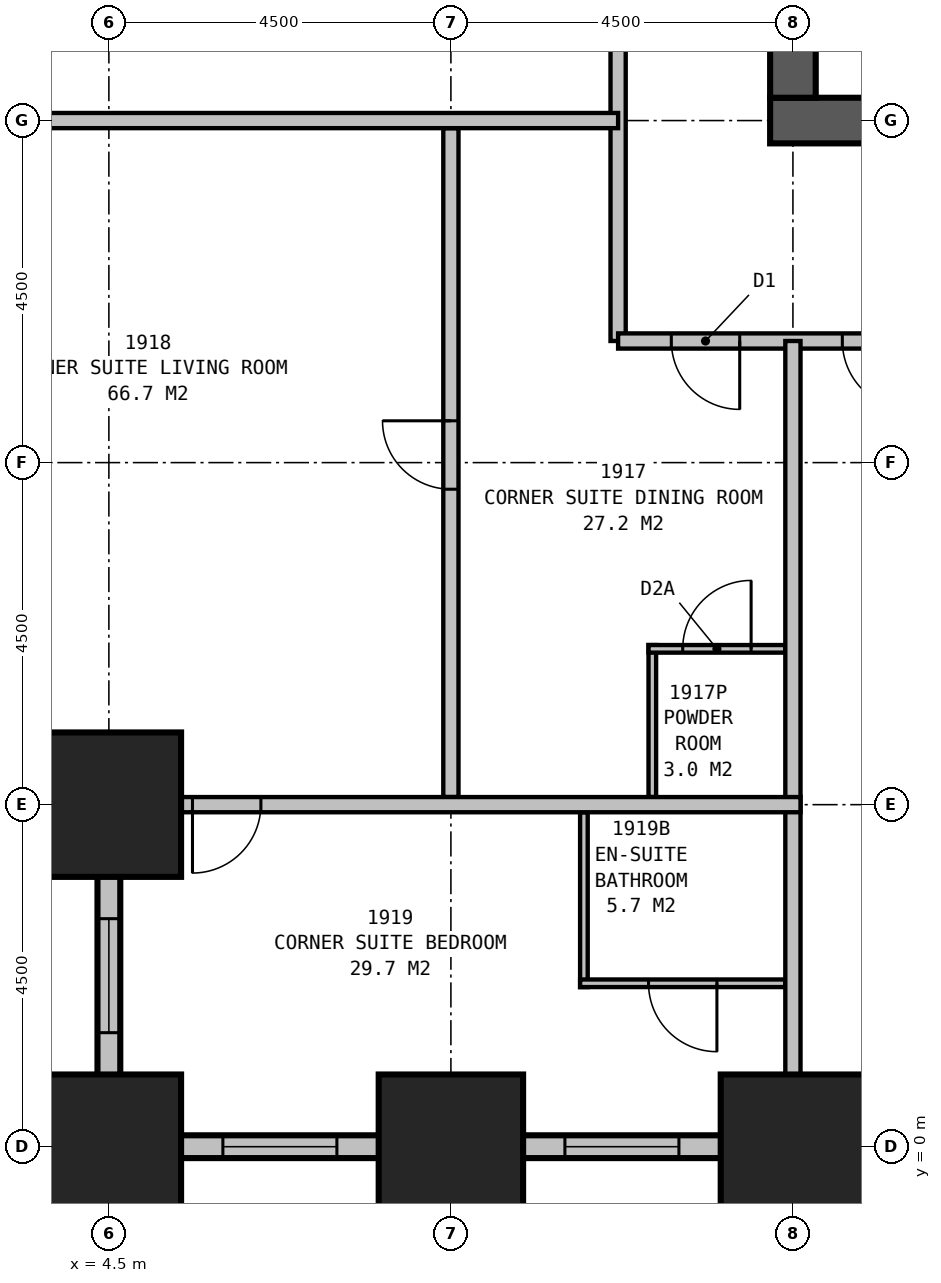
"""IFC4 building model, lengths in metres.
Left out: names, types, materials, properties, quantities, classifications, styles, units other than length and angle.
Written with IfcOpenShell. Run it as: python <this file> out.ifc"""

import sys

from ifc_helpers import new_model, si_unit, direction, frame, frame_2d, origin, origin_2d, place, context, subcontext, project, spatial, rectangle, extrude, element, fill, save


model = new_model("IFC4")
c1 = context("Model", 3, precision=1e-05, world=origin(), true_north=direction((0.0, 1.0)))
c2 = subcontext(c1, "Body", "Model", "MODEL_VIEW")
j1 = project(units=[si_unit("LENGTHUNIT", "METRE"), si_unit("PLANEANGLEUNIT", "RADIAN")], contexts=[c1])
p1 = place(None, origin())
s1 = spatial("IfcSite", under=j1, at=p1, CompositionType="ELEMENT")
p2 = place(p1, origin())
s2 = spatial("IfcBuilding", under=s1, at=p2, CompositionType="ELEMENT")
p3 = place(p2, frame((0.0, 0.0, 78.7)))
s3 = spatial("IfcBuildingStorey", under=s2, at=p3, CompositionType="ELEMENT", Elevation=78.7)
for number, where, z_axis, x_axis in (
    (1, (4.5, 4.5, 0.0), (0.0, 0.0, 1.0), (1.0, 0.0, 0.0)),
    (2, (4.5, 0.0, 0.0), (0.0, 0.0, 1.0), (1.0, 0.0, 0.0)),
    (3, (9.0, 0.0, 0.0), (0.0, 0.0, 1.0), (1.0, 0.0, 0.0)),
    (4, (13.5, 0.0, 0.0), (0.0, 0.0, 1.0), (1.0, 0.0, 0.0)),
):
    element("IfcColumn", number, at=place(p3, frame(where, z_axis=z_axis, x_axis=x_axis)), inside=s3, PredefinedType="COLUMN", context=c2, shape_type="SweptSolid", body=[
        extrude(rectangle(XDim=1.9, YDim=1.9, at=origin_2d()), origin(), (0.0, 0.0, 1.0), 3.5),
    ])
p4 = place(p3, frame((13.2, 13.5, 0.0), z_axis=(0.0, 0.0, 1.0), x_axis=(1.0, 0.0, 0.0)))
e5 = element("IfcWall", 5, at=p4, inside=s3, PredefinedType="SHEAR", context=c2, shape_type="SweptSolid", body=[
    extrude(rectangle(XDim=23.1, YDim=0.6, at=frame_2d((11.55, 0.0))), origin(), (0.0, 0.0, 1.0), 3.5),
])
p5 = place(p3, frame((13.5, 16.5, 0.0), z_axis=(0.0, 0.0, 1.0), x_axis=(0.0, -1.0, 0.0)))
e6 = element("IfcWall", 6, at=p5, inside=s3, PredefinedType="SHEAR", context=c2, shape_type="SweptSolid", body=[
    extrude(rectangle(XDim=2.7, YDim=0.6, at=frame_2d((1.35, 0.0))), origin(), (0.0, 0.0, 1.0), 3.5),
])
p6 = place(p3, frame((0.35, 4.5, 0.0), z_axis=(0.0, 0.0, 1.0), x_axis=(1.0, 0.0, 0.0)))
e7 = element("IfcWall", 7, at=p6, inside=s3, PredefinedType="STANDARD", context=c2, shape_type="SweptSolid", body=[
    extrude(rectangle(XDim=4.3, YDim=0.3, at=frame_2d((2.15, 0.0))), origin(), (0.0, 0.0, 1.0), 2.05),
])
p7 = place(p6, frame((1.4, 0.0, 0.5)))
e8 = element("IfcOpeningElement", 8, at=p7, cuts=e7, PredefinedType="OPENING", context=c2, shape_type="SweptSolid", body=[
    extrude(rectangle(XDim=1.5, YDim=1.4, at=frame_2d((0.75, 0.7))), frame((0.0, 0.16, 0.0), z_axis=(0.0, -1.0, 0.0), x_axis=(1.0, 0.0, 0.0)), (0.0, 0.0, 1.0), 0.32),
])
p8 = place(p3, frame((4.5, 4.65, 0.0), z_axis=(0.0, 0.0, 1.0), x_axis=(0.0, -1.0, 0.0)))
e9 = element("IfcWall", 9, at=p8, inside=s3, PredefinedType="STANDARD", context=c2, shape_type="SweptSolid", body=[
    extrude(rectangle(XDim=4.8, YDim=0.3, at=frame_2d((2.4, 0.0))), origin(), (0.0, 0.0, 1.0), 2.05),
])
p9 = place(p8, frame((1.65, 0.0, 0.5)))
e10 = element("IfcOpeningElement", 10, at=p9, cuts=e9, PredefinedType="OPENING", context=c2, shape_type="SweptSolid", body=[
    extrude(rectangle(XDim=1.5, YDim=1.4, at=frame_2d((0.75, 0.7))), frame((0.0, 0.16, 0.0), z_axis=(0.0, -1.0, 0.0), x_axis=(1.0, 0.0, 0.0)), (0.0, 0.0, 1.0), 0.32),
])
p10 = place(p3, frame((4.35, 0.0, 0.0), z_axis=(0.0, 0.0, 1.0), x_axis=(1.0, 0.0, 0.0)))
e11 = element("IfcWall", 11, at=p10, inside=s3, PredefinedType="STANDARD", context=c2, shape_type="SweptSolid", body=[
    extrude(rectangle(XDim=40.8, YDim=0.3, at=frame_2d((20.4, 0.0))), origin(), (0.0, 0.0, 1.0), 2.05),
])
p11 = place(p10, frame((1.65, 0.0, 0.5)))
e12 = element("IfcOpeningElement", 12, at=p11, cuts=e11, PredefinedType="OPENING", context=c2, shape_type="SweptSolid", body=[
    extrude(rectangle(XDim=1.5, YDim=1.4, at=frame_2d((0.75, 0.7))), frame((0.0, 0.16, 0.0), z_axis=(0.0, -1.0, 0.0), x_axis=(1.0, 0.0, 0.0)), (0.0, 0.0, 1.0), 0.32),
])
p12 = place(p10, frame((6.15, 0.0, 0.5)))
e13 = element("IfcOpeningElement", 13, at=p12, cuts=e11, PredefinedType="OPENING", context=c2, shape_type="SweptSolid", body=[
    extrude(rectangle(XDim=1.5, YDim=1.4, at=frame_2d((0.75, 0.7))), frame((0.0, 0.16, 0.0), z_axis=(0.0, -1.0, 0.0), x_axis=(1.0, 0.0, 0.0)), (0.0, 0.0, 1.0), 0.32),
])
p13 = place(p10, frame((10.65, 0.0, 0.5)))
e14 = element("IfcOpeningElement", 14, at=p13, cuts=e11, PredefinedType="OPENING", context=c2, shape_type="SweptSolid", body=[
    extrude(rectangle(XDim=1.5, YDim=1.4, at=frame_2d((0.75, 0.7))), frame((0.0, 0.16, 0.0), z_axis=(0.0, -1.0, 0.0), x_axis=(1.0, 0.0, 0.0)), (0.0, 0.0, 1.0), 0.32),
])
p14 = place(p10, frame((15.15, 0.0, 0.5)))
e15 = element("IfcOpeningElement", 15, at=p14, cuts=e11, PredefinedType="OPENING", context=c2, shape_type="SweptSolid", body=[
    extrude(rectangle(XDim=1.5, YDim=1.4, at=frame_2d((0.75, 0.7))), frame((0.0, 0.16, 0.0), z_axis=(0.0, -1.0, 0.0), x_axis=(1.0, 0.0, 0.0)), (0.0, 0.0, 1.0), 0.32),
])
p15 = place(p10, frame((19.65, 0.0, 0.5)))
e16 = element("IfcOpeningElement", 16, at=p15, cuts=e11, PredefinedType="OPENING", context=c2, shape_type="SweptSolid", body=[
    extrude(rectangle(XDim=1.5, YDim=1.4, at=frame_2d((0.75, 0.7))), frame((0.0, 0.16, 0.0), z_axis=(0.0, -1.0, 0.0), x_axis=(1.0, 0.0, 0.0)), (0.0, 0.0, 1.0), 0.32),
])
p16 = place(p10, frame((24.15, 0.0, 0.5)))
e17 = element("IfcOpeningElement", 17, at=p16, cuts=e11, PredefinedType="OPENING", context=c2, shape_type="SweptSolid", body=[
    extrude(rectangle(XDim=1.5, YDim=1.4, at=frame_2d((0.75, 0.7))), frame((0.0, 0.16, 0.0), z_axis=(0.0, -1.0, 0.0), x_axis=(1.0, 0.0, 0.0)), (0.0, 0.0, 1.0), 0.32),
])
p17 = place(p10, frame((28.65, 0.0, 0.5)))
e18 = element("IfcOpeningElement", 18, at=p17, cuts=e11, PredefinedType="OPENING", context=c2, shape_type="SweptSolid", body=[
    extrude(rectangle(XDim=1.5, YDim=1.4, at=frame_2d((0.75, 0.7))), frame((0.0, 0.16, 0.0), z_axis=(0.0, -1.0, 0.0), x_axis=(1.0, 0.0, 0.0)), (0.0, 0.0, 1.0), 0.32),
])
p18 = place(p10, frame((33.15, 0.0, 0.5)))
e19 = element("IfcOpeningElement", 19, at=p18, cuts=e11, PredefinedType="OPENING", context=c2, shape_type="SweptSolid", body=[
    extrude(rectangle(XDim=1.5, YDim=1.4, at=frame_2d((0.75, 0.7))), frame((0.0, 0.16, 0.0), z_axis=(0.0, -1.0, 0.0), x_axis=(1.0, 0.0, 0.0)), (0.0, 0.0, 1.0), 0.32),
])
p19 = place(p10, frame((37.65, 0.0, 0.5)))
e20 = element("IfcOpeningElement", 20, at=p19, cuts=e11, PredefinedType="OPENING", context=c2, shape_type="SweptSolid", body=[
    extrude(rectangle(XDim=1.5, YDim=1.4, at=frame_2d((0.75, 0.7))), frame((0.0, 0.16, 0.0), z_axis=(0.0, -1.0, 0.0), x_axis=(1.0, 0.0, 0.0)), (0.0, 0.0, 1.0), 0.32),
])
p20 = place(p3, frame((4.017, 36.149, 0.0), z_axis=(0.0, 0.0, 1.0), x_axis=(-0.110433201132, -0.993883548555, 0.0)))
e21 = element("IfcWall", 21, at=p20, inside=s3, PredefinedType="STANDARD", context=c2, shape_type="SweptSolid", body=[
    extrude(rectangle(XDim=31.994, YDim=0.3, at=frame_2d((15.997, 0.0))), origin(), (0.0, 0.0, 1.0), 2.05),
])
p21 = place(p20, frame((1.664, 0.0, 0.5)))
e22 = element("IfcOpeningElement", 22, at=p21, cuts=e21, PredefinedType="OPENING", context=c2, shape_type="SweptSolid", body=[
    extrude(rectangle(XDim=1.5, YDim=1.4, at=frame_2d((0.75, 0.7))), frame((0.0, 0.16, 0.0), z_axis=(0.0, -1.0, 0.0), x_axis=(1.0, 0.0, 0.0)), (0.0, 0.0, 1.0), 0.32),
])
p22 = place(p20, frame((6.192, 0.0, 0.5)))
e23 = element("IfcOpeningElement", 23, at=p22, cuts=e21, PredefinedType="OPENING", context=c2, shape_type="SweptSolid", body=[
    extrude(rectangle(XDim=1.5, YDim=1.4, at=frame_2d((0.75, 0.7))), frame((0.0, 0.16, 0.0), z_axis=(0.0, -1.0, 0.0), x_axis=(1.0, 0.0, 0.0)), (0.0, 0.0, 1.0), 0.32),
])
p23 = place(p20, frame((10.719, 0.0, 0.5)))
e24 = element("IfcOpeningElement", 24, at=p23, cuts=e21, PredefinedType="OPENING", context=c2, shape_type="SweptSolid", body=[
    extrude(rectangle(XDim=1.5, YDim=1.4, at=frame_2d((0.75, 0.7))), frame((0.0, 0.16, 0.0), z_axis=(0.0, -1.0, 0.0), x_axis=(1.0, 0.0, 0.0)), (0.0, 0.0, 1.0), 0.32),
])
p24 = place(p20, frame((15.247, 0.0, 0.5)))
e25 = element("IfcOpeningElement", 25, at=p24, cuts=e21, PredefinedType="OPENING", context=c2, shape_type="SweptSolid", body=[
    extrude(rectangle(XDim=1.5, YDim=1.4, at=frame_2d((0.75, 0.7))), frame((0.0, 0.16, 0.0), z_axis=(0.0, -1.0, 0.0), x_axis=(1.0, 0.0, 0.0)), (0.0, 0.0, 1.0), 0.32),
])
p25 = place(p20, frame((19.775, 0.0, 0.5)))
e26 = element("IfcOpeningElement", 26, at=p25, cuts=e21, PredefinedType="OPENING", context=c2, shape_type="SweptSolid", body=[
    extrude(rectangle(XDim=1.5, YDim=1.4, at=frame_2d((0.75, 0.7))), frame((0.0, 0.16, 0.0), z_axis=(0.0, -1.0, 0.0), x_axis=(1.0, 0.0, 0.0)), (0.0, 0.0, 1.0), 0.32),
])
p26 = place(p20, frame((24.302, 0.0, 0.5)))
e27 = element("IfcOpeningElement", 27, at=p26, cuts=e21, PredefinedType="OPENING", context=c2, shape_type="SweptSolid", body=[
    extrude(rectangle(XDim=1.5, YDim=1.4, at=frame_2d((0.75, 0.7))), frame((0.0, 0.16, 0.0), z_axis=(0.0, -1.0, 0.0), x_axis=(1.0, 0.0, 0.0)), (0.0, 0.0, 1.0), 0.32),
])
p27 = place(p20, frame((28.83, 0.0, 0.5)))
e28 = element("IfcOpeningElement", 28, at=p27, cuts=e21, PredefinedType="OPENING", context=c2, shape_type="SweptSolid", body=[
    extrude(rectangle(XDim=1.5, YDim=1.4, at=frame_2d((0.75, 0.7))), frame((0.0, 0.16, 0.0), z_axis=(0.0, -1.0, 0.0), x_axis=(1.0, 0.0, 0.0)), (0.0, 0.0, 1.0), 0.32),
])
p28 = place(p3, frame((11.2, 10.6, 0.0), z_axis=(0.0, 0.0, 1.0), x_axis=(1.0, 0.0, 0.0)))
e29 = element("IfcWall", 29, at=p28, inside=s3, PredefinedType="PARTITIONING", context=c2, shape_type="SweptSolid", body=[
    extrude(rectangle(XDim=27.1, YDim=0.2, at=frame_2d((13.55, 0.0))), origin(), (0.0, 0.0, 1.0), 3.25),
])
p29 = place(p28, frame((3.85, 0.0, 0.0), z_axis=(0.0, 0.0, 1.0), x_axis=(-1.0, 0.0, 0.0)))
e30 = element("IfcOpeningElement", 30, at=p29, cuts=e29, PredefinedType="OPENING", context=c2, shape_type="SweptSolid", body=[
    extrude(rectangle(XDim=0.9, YDim=2.1, at=frame_2d((0.45, 1.05))), frame((0.0, 0.11, 0.0), z_axis=(0.0, -1.0, 0.0), x_axis=(1.0, 0.0, 0.0)), (0.0, 0.0, 1.0), 0.22),
])
p30 = place(p28, frame((8.15, 0.0, 0.0), z_axis=(0.0, 0.0, 1.0), x_axis=(-1.0, 0.0, 0.0)))
e31 = element("IfcOpeningElement", 31, at=p30, cuts=e29, PredefinedType="OPENING", context=c2, shape_type="SweptSolid", body=[
    extrude(rectangle(XDim=1.0, YDim=2.1, at=frame_2d((0.5, 1.05))), frame((0.0, 0.11, 0.0), z_axis=(0.0, -1.0, 0.0), x_axis=(1.0, 0.0, 0.0)), (0.0, 0.0, 1.0), 0.22),
])
p31 = place(p28, frame((12.85, 0.0, 0.0), z_axis=(0.0, 0.0, 1.0), x_axis=(-1.0, 0.0, 0.0)))
e32 = element("IfcOpeningElement", 32, at=p31, cuts=e29, PredefinedType="OPENING", context=c2, shape_type="SweptSolid", body=[
    extrude(rectangle(XDim=0.9, YDim=2.1, at=frame_2d((0.45, 1.05))), frame((0.0, 0.11, 0.0), z_axis=(0.0, -1.0, 0.0), x_axis=(1.0, 0.0, 0.0)), (0.0, 0.0, 1.0), 0.22),
])
p32 = place(p28, frame((17.1, 0.0, 0.0), z_axis=(0.0, 0.0, 1.0), x_axis=(-1.0, 0.0, 0.0)))
e33 = element("IfcOpeningElement", 33, at=p32, cuts=e29, PredefinedType="OPENING", context=c2, shape_type="SweptSolid", body=[
    extrude(rectangle(XDim=1.0, YDim=2.1, at=frame_2d((0.5, 1.05))), frame((0.0, 0.11, 0.0), z_axis=(0.0, -1.0, 0.0), x_axis=(1.0, 0.0, 0.0)), (0.0, 0.0, 1.0), 0.22),
])
p33 = place(p28, frame((21.85, 0.0, 0.0), z_axis=(0.0, 0.0, 1.0), x_axis=(-1.0, 0.0, 0.0)))
e34 = element("IfcOpeningElement", 34, at=p33, cuts=e29, PredefinedType="OPENING", context=c2, shape_type="SweptSolid", body=[
    extrude(rectangle(XDim=0.9, YDim=2.1, at=frame_2d((0.45, 1.05))), frame((0.0, 0.11, 0.0), z_axis=(0.0, -1.0, 0.0), x_axis=(1.0, 0.0, 0.0)), (0.0, 0.0, 1.0), 0.22),
])
p34 = place(p28, frame((1.6, 0.0, 0.0), z_axis=(0.0, 0.0, 1.0), x_axis=(-1.0, 0.0, 0.0)))
e35 = element("IfcOpeningElement", 35, at=p34, cuts=e29, PredefinedType="OPENING", context=c2, shape_type="SweptSolid", body=[
    extrude(rectangle(XDim=0.9, YDim=2.1, at=frame_2d((0.45, 1.05))), frame((0.0, 0.11, 0.0), z_axis=(0.0, -1.0, 0.0), x_axis=(1.0, 0.0, 0.0)), (0.0, 0.0, 1.0), 0.22),
])
p35 = place(p28, frame((26.4, 0.0, 0.0), z_axis=(0.0, 0.0, 1.0), x_axis=(-1.0, 0.0, 0.0)))
e36 = element("IfcOpeningElement", 36, at=p35, cuts=e29, PredefinedType="OPENING", context=c2, shape_type="SweptSolid", body=[
    extrude(rectangle(XDim=0.9, YDim=2.1, at=frame_2d((0.45, 1.05))), frame((0.0, 0.11, 0.0), z_axis=(0.0, -1.0, 0.0), x_axis=(1.0, 0.0, 0.0)), (0.0, 0.0, 1.0), 0.22),
])
p36 = place(p3, frame((11.2, 10.6, 0.0), z_axis=(0.0, 0.0, 1.0), x_axis=(0.0, 1.0, 0.0)))
e37 = element("IfcWall", 37, at=p36, inside=s3, PredefinedType="PARTITIONING", context=c2, shape_type="SweptSolid", body=[
    extrude(rectangle(XDim=18.7, YDim=0.2, at=frame_2d((9.35, 0.0))), origin(), (0.0, 0.0, 1.0), 3.25),
])
p37 = place(p36, frame((4.75, 0.0, 0.0)))
e38 = element("IfcOpeningElement", 38, at=p37, cuts=e37, PredefinedType="OPENING", context=c2, shape_type="SweptSolid", body=[
    extrude(rectangle(XDim=0.9, YDim=2.1, at=frame_2d((0.45, 1.05))), frame((0.0, 0.11, 0.0), z_axis=(0.0, -1.0, 0.0), x_axis=(1.0, 0.0, 0.0)), (0.0, 0.0, 1.0), 0.22),
])
p38 = place(p36, frame((14.65, 0.0, 0.0)))
e39 = element("IfcOpeningElement", 39, at=p38, cuts=e37, PredefinedType="OPENING", context=c2, shape_type="SweptSolid", body=[
    extrude(rectangle(XDim=1.0, YDim=2.1, at=frame_2d((0.5, 1.05))), frame((0.0, 0.11, 0.0), z_axis=(0.0, -1.0, 0.0), x_axis=(1.0, 0.0, 0.0)), (0.0, 0.0, 1.0), 0.22),
])
p39 = place(p3, frame((11.2, 13.5, 0.0), z_axis=(0.0, 0.0, 1.0), x_axis=(-1.0, 0.0, 0.0)))
e40 = element("IfcWall", 40, at=p39, inside=s3, PredefinedType="PARTITIONING", context=c2, shape_type="SweptSolid", body=[
    extrude(rectangle(XDim=9.921, YDim=0.2, at=frame_2d((4.96, 0.0))), origin(), (0.0, 0.0, 1.0), 1.95),
])
p40 = place(p3, frame((13.5, 10.6, 0.0), z_axis=(0.0, 0.0, 1.0), x_axis=(0.0, -1.0, 0.0)))
e41 = element("IfcWall", 41, at=p40, inside=s3, PredefinedType="PARTITIONING", context=c2, shape_type="SweptSolid", body=[
    extrude(rectangle(XDim=10.6, YDim=0.2, at=frame_2d((5.3, 0.0))), origin(), (0.0, 0.0, 1.0), 2.25),
])
p41 = place(p3, frame((13.6, 4.5, 0.0), z_axis=(0.0, 0.0, 1.0), x_axis=(-1.0, 0.0, 0.0)))
e42 = element("IfcWall", 42, at=p41, inside=s3, PredefinedType="PARTITIONING", context=c2, shape_type="SweptSolid", body=[
    extrude(rectangle(XDim=9.1, YDim=0.2, at=frame_2d((4.55, 0.0))), origin(), (0.0, 0.0, 1.0), 3.25),
])
p42 = place(p41, frame((7.1, 0.0, 0.0)))
e43 = element("IfcOpeningElement", 43, at=p42, cuts=e42, PredefinedType="OPENING", context=c2, shape_type="SweptSolid", body=[
    extrude(rectangle(XDim=0.9, YDim=2.1, at=frame_2d((0.45, 1.05))), frame((0.0, 0.11, 0.0), z_axis=(0.0, -1.0, 0.0), x_axis=(1.0, 0.0, 0.0)), (0.0, 0.0, 1.0), 0.22),
])
p43 = place(p3, frame((9.0, 4.6, 0.0), z_axis=(0.0, 0.0, 1.0), x_axis=(0.0, 1.0, 0.0)))
e44 = element("IfcWall", 44, at=p43, inside=s3, PredefinedType="PARTITIONING", context=c2, shape_type="SweptSolid", body=[
    extrude(rectangle(XDim=8.8, YDim=0.2, at=frame_2d((4.4, 0.0))), origin(), (0.0, 0.0, 1.0), 2.25),
])
p44 = place(p43, frame((4.05, 0.0, 0.0)))
e45 = element("IfcOpeningElement", 45, at=p44, cuts=e44, PredefinedType="OPENING", context=c2, shape_type="SweptSolid", body=[
    extrude(rectangle(XDim=0.9, YDim=2.1, at=frame_2d((0.45, 1.05))), frame((0.0, 0.11, 0.0), z_axis=(0.0, -1.0, 0.0), x_axis=(1.0, 0.0, 0.0)), (0.0, 0.0, 1.0), 0.22),
])
p45 = place(p3, frame((11.65, 4.6, 0.0), z_axis=(0.0, 0.0, 1.0), x_axis=(0.0, 1.0, 0.0)))
e46 = element("IfcWall", 46, at=p45, inside=s3, PredefinedType="PLUMBINGWALL", context=c2, shape_type="SweptSolid", body=[
    extrude(rectangle(XDim=2.0, YDim=0.1, at=frame_2d((1.0, 0.0))), origin(), (0.0, 0.0, 1.0), 3.25),
])
p46 = place(p3, frame((13.4, 6.55, 0.0), z_axis=(0.0, 0.0, 1.0), x_axis=(-1.0, 0.0, 0.0)))
e47 = element("IfcWall", 47, at=p46, inside=s3, PredefinedType="PLUMBINGWALL", context=c2, shape_type="SweptSolid", body=[
    extrude(rectangle(XDim=1.8, YDim=0.1, at=frame_2d((0.9, 0.0))), origin(), (0.0, 0.0, 1.0), 3.25),
])
p47 = place(p46, frame((1.35, 0.0, 0.0), z_axis=(0.0, 0.0, 1.0), x_axis=(-1.0, 0.0, 0.0)))
e48 = element("IfcOpeningElement", 48, at=p47, cuts=e47, PredefinedType="OPENING", context=c2, shape_type="SweptSolid", body=[
    extrude(rectangle(XDim=0.9, YDim=2.1, at=frame_2d((0.45, 1.05))), frame((0.0, 0.06, 0.0), z_axis=(0.0, -1.0, 0.0), x_axis=(1.0, 0.0, 0.0)), (0.0, 0.0, 1.0), 0.12),
])
p48 = place(p3, frame((10.75, 4.4, 0.0), z_axis=(0.0, 0.0, 1.0), x_axis=(0.0, -1.0, 0.0)))
e49 = element("IfcWall", 49, at=p48, inside=s3, PredefinedType="PLUMBINGWALL", context=c2, shape_type="SweptSolid", body=[
    extrude(rectangle(XDim=2.3, YDim=0.1, at=frame_2d((1.15, 0.0))), origin(), (0.0, 0.0, 1.0), 3.25),
])
p49 = place(p3, frame((13.4, 2.15, 0.0), z_axis=(0.0, 0.0, 1.0), x_axis=(-1.0, 0.0, 0.0)))
e50 = element("IfcWall", 50, at=p49, inside=s3, PredefinedType="PLUMBINGWALL", context=c2, shape_type="SweptSolid", body=[
    extrude(rectangle(XDim=2.7, YDim=0.1, at=frame_2d((1.35, 0.0))), origin(), (0.0, 0.0, 1.0), 3.25),
])
p50 = place(p49, frame((0.9, 0.0, 0.0)))
e51 = element("IfcOpeningElement", 51, at=p50, cuts=e50, PredefinedType="OPENING", context=c2, shape_type="SweptSolid", body=[
    extrude(rectangle(XDim=0.9, YDim=2.1, at=frame_2d((0.45, 1.05))), frame((0.0, 0.06, 0.0), z_axis=(0.0, -1.0, 0.0), x_axis=(1.0, 0.0, 0.0)), (0.0, 0.0, 1.0), 0.12),
])
p51 = place(p9, origin())
e52 = element("IfcWindow", 52, at=p51, inside=s3, PartitioningType="SINGLE_PANEL", PredefinedType="WINDOW", context=c2, shape_type="SweptSolid", body=[
    extrude(rectangle(XDim=1.5, YDim=1.4, at=frame_2d((0.75, 0.7))), frame((0.0, 0.03, 0.0), z_axis=(0.0, -1.0, 0.0), x_axis=(1.0, 0.0, 0.0)), (0.0, 0.0, 1.0), 0.06),
])
fill(e10, e52)
p52 = place(p11, origin())
e53 = element("IfcWindow", 53, at=p52, inside=s3, PartitioningType="SINGLE_PANEL", PredefinedType="WINDOW", context=c2, shape_type="SweptSolid", body=[
    extrude(rectangle(XDim=1.5, YDim=1.4, at=frame_2d((0.75, 0.7))), frame((0.0, 0.03, 0.0), z_axis=(0.0, -1.0, 0.0), x_axis=(1.0, 0.0, 0.0)), (0.0, 0.0, 1.0), 0.06),
])
fill(e12, e53)
p53 = place(p12, origin())
e54 = element("IfcWindow", 54, at=p53, inside=s3, PartitioningType="SINGLE_PANEL", PredefinedType="WINDOW", context=c2, shape_type="SweptSolid", body=[
    extrude(rectangle(XDim=1.5, YDim=1.4, at=frame_2d((0.75, 0.7))), frame((0.0, 0.03, 0.0), z_axis=(0.0, -1.0, 0.0), x_axis=(1.0, 0.0, 0.0)), (0.0, 0.0, 1.0), 0.06),
])
fill(e13, e54)
p54 = place(p29, origin())
e55 = element("IfcDoor", 55, at=p54, inside=s3, OperationType="SINGLE_SWING_LEFT", PredefinedType="DOOR", context=c2, shape_type="SweptSolid", body=[
    extrude(rectangle(XDim=0.9, YDim=2.1, at=frame_2d((0.45, 1.05))), frame((0.0, 0.025, 0.0), z_axis=(0.0, -1.0, 0.0), x_axis=(1.0, 0.0, 0.0)), (0.0, 0.0, 1.0), 0.05),
])
fill(e30, e55)
p55 = place(p34, origin())
e56 = element("IfcDoor", 56, at=p55, inside=s3, OperationType="SINGLE_SWING_LEFT", PredefinedType="DOOR", context=c2, shape_type="SweptSolid", body=[
    extrude(rectangle(XDim=0.9, YDim=2.1, at=frame_2d((0.45, 1.05))), frame((0.0, 0.025, 0.0), z_axis=(0.0, -1.0, 0.0), x_axis=(1.0, 0.0, 0.0)), (0.0, 0.0, 1.0), 0.05),
])
fill(e35, e56)
p56 = place(p42, origin())
e57 = element("IfcDoor", 57, at=p56, inside=s3, OperationType="SINGLE_SWING_RIGHT", PredefinedType="DOOR", context=c2, shape_type="SweptSolid", body=[
    extrude(rectangle(XDim=0.9, YDim=2.1, at=frame_2d((0.45, 1.05))), frame((0.0, 0.025, 0.0), z_axis=(0.0, -1.0, 0.0), x_axis=(1.0, 0.0, 0.0)), (0.0, 0.0, 1.0), 0.05),
])
fill(e43, e57)
p57 = place(p44, origin())
e58 = element("IfcDoor", 58, at=p57, inside=s3, OperationType="SINGLE_SWING_RIGHT", PredefinedType="DOOR", context=c2, shape_type="SweptSolid", body=[
    extrude(rectangle(XDim=0.9, YDim=2.1, at=frame_2d((0.45, 1.05))), frame((0.0, 0.025, 0.0), z_axis=(0.0, -1.0, 0.0), x_axis=(1.0, 0.0, 0.0)), (0.0, 0.0, 1.0), 0.05),
])
fill(e45, e58)
p58 = place(p47, origin())
e59 = element("IfcDoor", 59, at=p58, inside=s3, OperationType="SINGLE_SWING_RIGHT", PredefinedType="DOOR", context=c2, shape_type="SweptSolid", body=[
    extrude(rectangle(XDim=0.9, YDim=2.1, at=frame_2d((0.45, 1.05))), frame((0.0, 0.025, 0.0), z_axis=(0.0, -1.0, 0.0), x_axis=(1.0, 0.0, 0.0)), (0.0, 0.0, 1.0), 0.05),
])
fill(e48, e59)
p59 = place(p50, origin())
e60 = element("IfcDoor", 60, at=p59, inside=s3, OperationType="SINGLE_SWING_LEFT", PredefinedType="DOOR", context=c2, shape_type="SweptSolid", body=[
    extrude(rectangle(XDim=0.9, YDim=2.1, at=frame_2d((0.45, 1.05))), frame((0.0, 0.025, 0.0), z_axis=(0.0, -1.0, 0.0), x_axis=(1.0, 0.0, 0.0)), (0.0, 0.0, 1.0), 0.05),
])
fill(e51, e60)
save(model, sys.argv[1])
